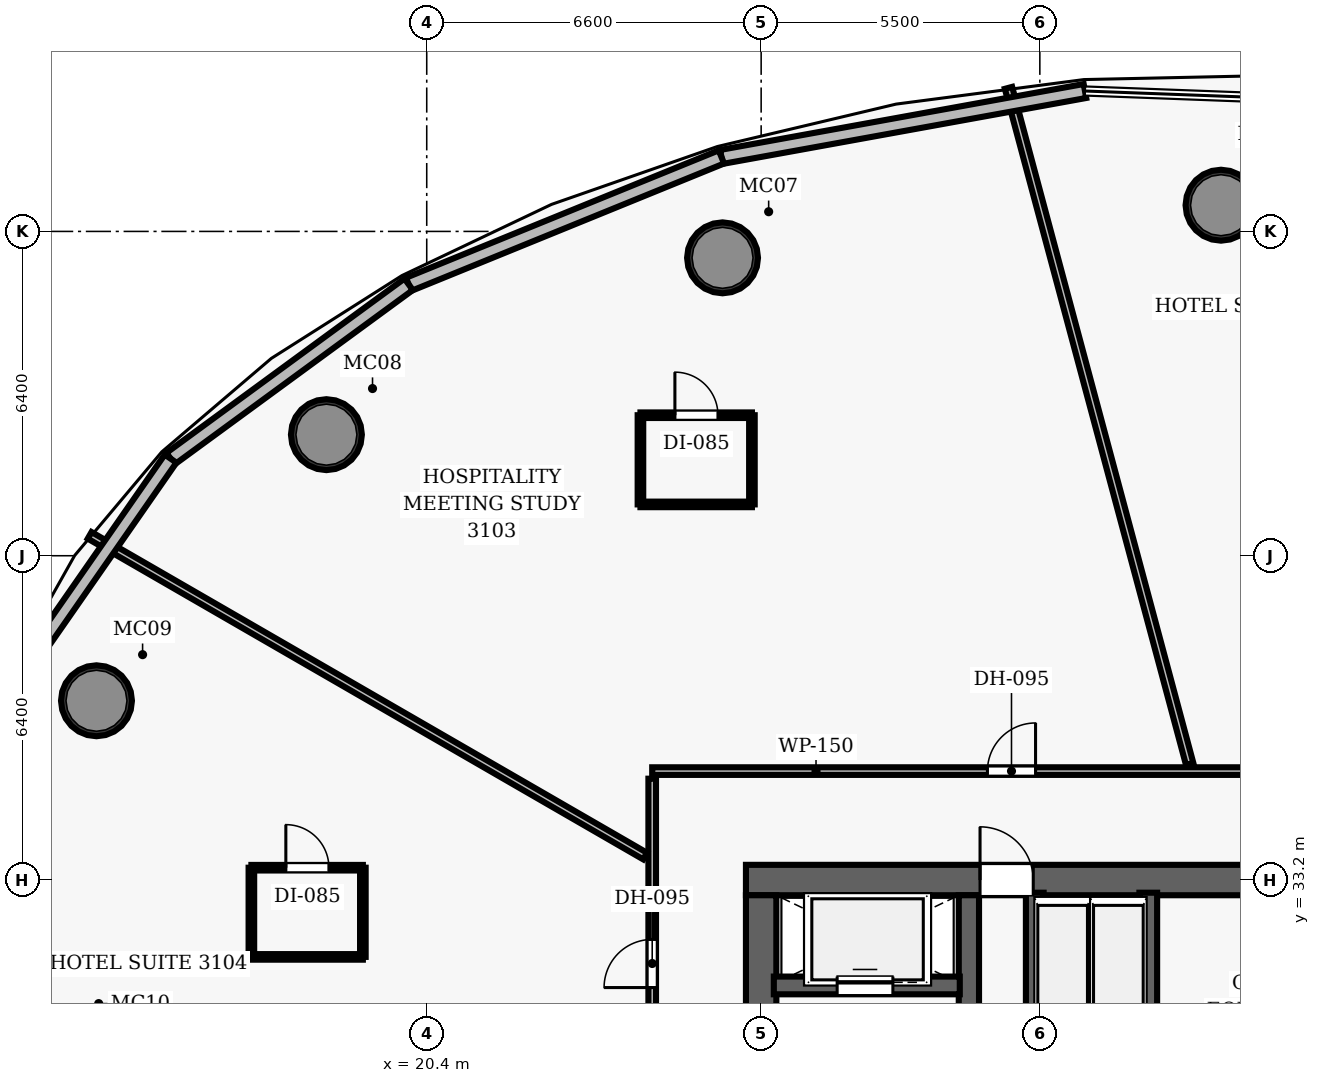
"""IFC4 building model, lengths in metres.
Left out: names, types, materials, properties, quantities, classifications, styles, units other than length and angle.
Written with IfcOpenShell. Run it as: python <this file> out.ifc"""

import sys

from ifc_helpers import new_model, si_unit, direction, frame, frame_2d, origin, origin_2d, place, context, subcontext, project, spatial, rectangle, hollow_circle, extrude, element, fill, save


model = new_model("IFC4")
c1 = context("Model", 3, precision=1e-05, world=origin(), true_north=direction((0.0, 1.0)))
c2 = subcontext(c1, "Body", "Model", "MODEL_VIEW")
j1 = project(units=[si_unit("LENGTHUNIT", "METRE"), si_unit("PLANEANGLEUNIT", "RADIAN")], contexts=[c1])
p1 = place(None, origin())
s1 = spatial("IfcSite", under=j1, at=p1, CompositionType="ELEMENT")
p2 = place(p1, origin())
s2 = spatial("IfcBuilding", under=s1, at=p2, CompositionType="ELEMENT")
p3 = place(p2, frame((0.0, 0.0, 127.3)))
s3 = spatial("IfcBuildingStorey", under=s2, at=p3, CompositionType="ELEMENT", Elevation=127.3)
p4 = place(p3, frame((26.7, 33.2, 0.0), z_axis=(0.0, 0.0, 1.0), x_axis=(1.0, 0.0, 0.0)))
e1 = element("IfcWall", 1, at=p4, inside=s3, PredefinedType="SHEAR", context=c2, shape_type="SweptSolid", body=[
    extrude(rectangle(XDim=22.6, YDim=0.6, at=frame_2d((11.3, 0.0))), origin(), (0.0, 0.0, 1.0), 3.5),
])
p5 = place(p4, frame((4.62, 0.0, 0.0)))
e2 = element("IfcOpeningElement", 2, at=p5, cuts=e1, PredefinedType="OPENING", context=c2, shape_type="SweptSolid", body=[
    extrude(rectangle(XDim=1.05, YDim=2.15, at=frame_2d((0.525, 1.075))), frame((0.0, 0.31, 0.0), z_axis=(0.0, -1.0, 0.0), x_axis=(1.0, 0.0, 0.0)), (0.0, 0.0, 1.0), 0.62),
])
p6 = place(p4, frame((14.52, 0.0, 0.0)))
e3 = element("IfcOpeningElement", 3, at=p6, cuts=e1, PredefinedType="OPENING", context=c2, shape_type="SweptSolid", body=[
    extrude(rectangle(XDim=1.05, YDim=2.15, at=frame_2d((0.525, 1.075))), frame((0.0, 0.31, 0.0), z_axis=(0.0, -1.0, 0.0), x_axis=(1.0, 0.0, 0.0)), (0.0, 0.0, 1.0), 0.62),
])
p7 = place(p3, frame((27.0, 19.1, 0.0), z_axis=(0.0, 0.0, 1.0), x_axis=(0.0, 1.0, 0.0)))
e4 = element("IfcWall", 4, at=p7, inside=s3, PredefinedType="SHEAR", context=c2, shape_type="SweptSolid", body=[
    extrude(rectangle(XDim=13.8, YDim=0.6, at=frame_2d((6.9, 0.0))), origin(), (0.0, 0.0, 1.0), 3.5),
])
p8 = place(p7, frame((8.2, 0.0, 0.0)))
e5 = element("IfcOpeningElement", 5, at=p8, cuts=e4, PredefinedType="OPENING", context=c2, shape_type="SweptSolid", body=[
    extrude(rectangle(XDim=1.05, YDim=2.15, at=frame_2d((0.525, 1.075))), frame((0.0, 0.31, 0.0), z_axis=(0.0, -1.0, 0.0), x_axis=(1.0, 0.0, 0.0)), (0.0, 0.0, 1.0), 0.62),
])
p9 = place(p3, frame((31.1, 19.1, 0.0), z_axis=(0.0, 0.0, 1.0), x_axis=(0.0, 1.0, 0.0)))
e6 = element("IfcWall", 6, at=p9, inside=s3, PredefinedType="SHEAR", context=c2, shape_type="SweptSolid", body=[
    extrude(rectangle(XDim=13.8, YDim=0.4, at=frame_2d((6.9, 0.0))), origin(), (0.0, 0.0, 1.0), 3.5),
])
for number, where, z_axis, x_axis in (
    (7, (36.076, 46.517, 0.0), (0.0, 0.0, 1.0), (1.0, 0.0, 0.0)),
    (8, (26.238, 45.479, 0.0), (0.0, 0.0, 1.0), (1.0, 0.0, 0.0)),
    (9, (18.42, 41.989, 0.0), (0.0, 0.0, 1.0), (1.0, 0.0, 0.0)),
    (10, (13.882, 36.738, 0.0), (0.0, 0.0, 1.0), (1.0, 0.0, 0.0)),
):
    element("IfcColumn", number, at=place(p3, frame(where, z_axis=z_axis, x_axis=x_axis)), inside=s3, PredefinedType="COLUMN", context=c2, shape_type="SweptSolid", body=[
        extrude(hollow_circle(Radius=0.7, WallThickness=0.055, at=origin_2d()), origin(), (0.0, 0.0, 1.0), 3.5),
    ])
p10 = place(p3, frame((27.25, 31.12, 0.0), z_axis=(0.0, 0.0, 1.0), x_axis=(1.0, 0.0, 0.0)))
e11 = element("IfcWall", 11, at=p10, inside=s3, PredefinedType="SHEAR", context=c2, shape_type="SweptSolid", body=[
    extrude(rectangle(XDim=3.67, YDim=0.35, at=frame_2d((1.835, 0.0))), origin(), (0.0, 0.0, 1.0), 2.675),
])
p11 = place(p10, frame((1.25, 0.0, 0.0)))
e12 = element("IfcOpeningElement", 12, at=p11, cuts=e11, PredefinedType="OPENING", context=c2, shape_type="SweptSolid", body=[
    extrude(rectangle(XDim=1.1, YDim=2.15, at=frame_2d((0.55, 1.075))), frame((0.0, 0.185, 0.0), z_axis=(0.0, -1.0, 0.0), x_axis=(1.0, 0.0, 0.0)), (0.0, 0.0, 1.0), 0.37),
])
p12 = place(p3, frame((34.64, 26.69, 0.0), z_axis=(0.0, 0.0, 1.0), x_axis=(0.0, 1.0, 0.0)))
e13 = element("IfcWall", 13, at=p12, inside=s3, PredefinedType="SHEAR", context=c2, shape_type="SweptSolid", body=[
    extrude(rectangle(XDim=6.26, YDim=0.35, at=frame_2d((3.13, 0.0))), origin(), (0.0, 0.0, 1.0), 3.5),
])
p13 = place(p3, frame((32.4, 30.22, 0.0), z_axis=(0.0, 0.0, 1.0), x_axis=(0.0, 1.0, 0.0)))
e14 = element("IfcWall", 14, at=p13, inside=s3, PredefinedType="SHEAR", context=c2, shape_type="SweptSolid", body=[
    extrude(rectangle(XDim=2.73, YDim=0.35, at=frame_2d((1.365, 0.0))), origin(), (0.0, 0.0, 1.0), 2.675),
])
p14 = place(p3, frame((24.85, 35.35, 0.0), z_axis=(0.0, 0.0, 1.0), x_axis=(1.0, 0.0, 0.0)))
e15 = element("IfcWall", 15, at=p14, inside=s3, PredefinedType="PARTITIONING", context=c2, shape_type="SweptSolid", body=[
    extrude(rectangle(XDim=26.0, YDim=0.15, at=frame_2d((13.0, 0.0))), origin(), (0.0, 0.0, 1.0), 2.675),
])
p15 = place(p14, frame((19.766, 0.0, 0.0)))
e16 = element("IfcOpeningElement", 16, at=p15, cuts=e15, PredefinedType="OPENING", context=c2, shape_type="SweptSolid", body=[
    extrude(rectangle(XDim=0.95, YDim=2.15, at=frame_2d((0.475, 1.075))), frame((0.0, 0.085, 0.0), z_axis=(0.0, -1.0, 0.0), x_axis=(1.0, 0.0, 0.0)), (0.0, 0.0, 1.0), 0.17),
])
p16 = place(p14, frame((12.852, 0.0, 0.0)))
e17 = element("IfcOpeningElement", 17, at=p16, cuts=e15, PredefinedType="OPENING", context=c2, shape_type="SweptSolid", body=[
    extrude(rectangle(XDim=0.95, YDim=2.15, at=frame_2d((0.475, 1.075))), frame((0.0, 0.085, 0.0), z_axis=(0.0, -1.0, 0.0), x_axis=(1.0, 0.0, 0.0)), (0.0, 0.0, 1.0), 0.17),
])
p17 = place(p14, frame((6.616, 0.0, 0.0)))
e18 = element("IfcOpeningElement", 18, at=p17, cuts=e15, PredefinedType="OPENING", context=c2, shape_type="SweptSolid", body=[
    extrude(rectangle(XDim=0.95, YDim=2.15, at=frame_2d((0.475, 1.075))), frame((0.0, 0.085, 0.0), z_axis=(0.0, -1.0, 0.0), x_axis=(1.0, 0.0, 0.0)), (0.0, 0.0, 1.0), 0.17),
])
p18 = place(p3, frame((24.85, 27.08, 0.0), z_axis=(0.0, 0.0, 1.0), x_axis=(0.0, 1.0, 0.0)))
e19 = element("IfcWall", 19, at=p18, inside=s3, PredefinedType="PARTITIONING", context=c2, shape_type="SweptSolid", body=[
    extrude(rectangle(XDim=8.12, YDim=0.15, at=frame_2d((4.06, 0.0))), origin(), (0.0, 0.0, 1.0), 2.675),
])
p19 = place(p18, frame((3.998, 0.0, 0.0)))
e20 = element("IfcOpeningElement", 20, at=p19, cuts=e19, PredefinedType="OPENING", context=c2, shape_type="SweptSolid", body=[
    extrude(rectangle(XDim=0.95, YDim=2.15, at=frame_2d((0.475, 1.075))), frame((0.0, 0.085, 0.0), z_axis=(0.0, -1.0, 0.0), x_axis=(1.0, 0.0, 0.0)), (0.0, 0.0, 1.0), 0.17),
])
p20 = place(p3, frame((35.457, 35.49, 0.0), z_axis=(0.0, 0.0, 1.0), x_axis=(-0.258827369618, 0.965923595704, 0.0)))
e21 = element("IfcWall", 21, at=p20, inside=s3, PredefinedType="PARTITIONING", context=c2, shape_type="SweptSolid", body=[
    extrude(rectangle(XDim=13.814, YDim=0.15, at=frame_2d((6.907, 0.0))), origin(), (0.0, 0.0, 1.0), 2.675),
])
p21 = place(p3, frame((24.71, 33.673, 0.0), z_axis=(0.0, 0.0, 1.0), x_axis=(-0.866026921982, 0.499997370395, 0.0)))
e22 = element("IfcWall", 22, at=p21, inside=s3, PredefinedType="PARTITIONING", context=c2, shape_type="SweptSolid", body=[
    extrude(rectangle(XDim=12.658, YDim=0.15, at=frame_2d((6.329, 0.0))), origin(), (0.0, 0.0, 1.0), 2.675),
])
p22 = place(p3, frame((24.618, 40.613, 0.0), z_axis=(0.0, 0.0, 1.0), x_axis=(1.0, 0.0, 0.0)))
e23 = element("IfcWall", 23, at=p22, inside=s3, PredefinedType="PARTITIONING", context=c2, shape_type="SweptSolid", body=[
    extrude(rectangle(XDim=2.2, YDim=0.11, at=frame_2d((1.1, 0.0))), origin(), (0.0, 0.0, 1.0), 2.675),
])
p23 = place(p3, frame((24.618, 42.373, 0.0), z_axis=(0.0, 0.0, 1.0), x_axis=(1.0, 0.0, 0.0)))
e24 = element("IfcWall", 24, at=p23, inside=s3, PredefinedType="PARTITIONING", context=c2, shape_type="SweptSolid", body=[
    extrude(rectangle(XDim=2.2, YDim=0.11, at=frame_2d((1.1, 0.0))), origin(), (0.0, 0.0, 1.0), 2.675),
])
p24 = place(p23, frame((0.68, 0.0, 0.0)))
e25 = element("IfcOpeningElement", 25, at=p24, cuts=e24, PredefinedType="OPENING", context=c2, shape_type="SweptSolid", body=[
    extrude(rectangle(XDim=0.85, YDim=2.1, at=frame_2d((0.425, 1.05))), frame((0.0, 0.065, 0.0), z_axis=(0.0, -1.0, 0.0), x_axis=(1.0, 0.0, 0.0)), (0.0, 0.0, 1.0), 0.13),
])
for number, where, z_axis, x_axis in (
    (26, (24.618, 40.613, 0.0), (0.0, 0.0, 1.0), (0.0, 1.0, 0.0)),
    (27, (26.818, 40.613, 0.0), (0.0, 0.0, 1.0), (0.0, 1.0, 0.0)),
):
    element("IfcWall", number, at=place(p3, frame(where, z_axis=z_axis, x_axis=x_axis)), inside=s3, PredefinedType="PARTITIONING", context=c2, shape_type="SweptSolid", body=[
        extrude(rectangle(XDim=1.76, YDim=0.11, at=frame_2d((0.88, 0.0))), origin(), (0.0, 0.0, 1.0), 2.675),
    ])
p25 = place(p3, frame((16.94, 31.683, 0.0), z_axis=(0.0, 0.0, 1.0), x_axis=(1.0, 0.0, 0.0)))
e28 = element("IfcWall", 28, at=p25, inside=s3, PredefinedType="PARTITIONING", context=c2, shape_type="SweptSolid", body=[
    extrude(rectangle(XDim=2.2, YDim=0.11, at=frame_2d((1.1, 0.0))), origin(), (0.0, 0.0, 1.0), 2.675),
])
p26 = place(p3, frame((16.94, 33.443, 0.0), z_axis=(0.0, 0.0, 1.0), x_axis=(1.0, 0.0, 0.0)))
e29 = element("IfcWall", 29, at=p26, inside=s3, PredefinedType="PARTITIONING", context=c2, shape_type="SweptSolid", body=[
    extrude(rectangle(XDim=2.2, YDim=0.11, at=frame_2d((1.1, 0.0))), origin(), (0.0, 0.0, 1.0), 2.675),
])
p27 = place(p26, frame((0.68, 0.0, 0.0)))
e30 = element("IfcOpeningElement", 30, at=p27, cuts=e29, PredefinedType="OPENING", context=c2, shape_type="SweptSolid", body=[
    extrude(rectangle(XDim=0.85, YDim=2.1, at=frame_2d((0.425, 1.05))), frame((0.0, 0.065, 0.0), z_axis=(0.0, -1.0, 0.0), x_axis=(1.0, 0.0, 0.0)), (0.0, 0.0, 1.0), 0.13),
])
for number, where, z_axis, x_axis in (
    (31, (16.94, 31.683, 0.0), (0.0, 0.0, 1.0), (0.0, 1.0, 0.0)),
    (32, (19.14, 31.683, 0.0), (0.0, 0.0, 1.0), (0.0, 1.0, 0.0)),
):
    element("IfcWall", number, at=place(p3, frame(where, z_axis=z_axis, x_axis=x_axis)), inside=s3, PredefinedType="PARTITIONING", context=c2, shape_type="SweptSolid", body=[
        extrude(rectangle(XDim=1.76, YDim=0.11, at=frame_2d((0.88, 0.0))), origin(), (0.0, 0.0, 1.0), 2.675),
    ])
p28 = place(p3, frame((26.216, 47.47, 0.0), z_axis=(0.0, 0.0, 1.0), x_axis=(0.983958718809, 0.178396299514, 0.0)))
e33 = element("IfcWall", 33, at=p28, inside=s3, PredefinedType="SOLIDWALL", context=c2, shape_type="SweptSolid", body=[
    extrude(rectangle(XDim=7.292, YDim=0.28, at=frame_2d((3.646, 0.0))), origin(), (0.0, 0.0, 1.0), 3.26),
])
p29 = place(p3, frame((20.043, 44.956, 0.0), z_axis=(0.0, 0.0, 1.0), x_axis=(0.926116532719, 0.37723754827, 0.0)))
e34 = element("IfcWall", 34, at=p29, inside=s3, PredefinedType="SOLIDWALL", context=c2, shape_type="SweptSolid", body=[
    extrude(rectangle(XDim=6.665, YDim=0.28, at=frame_2d((3.333, 0.0))), origin(), (0.0, 0.0, 1.0), 3.26),
])
p30 = place(p3, frame((15.345, 41.516, 0.0), z_axis=(0.0, 0.0, 1.0), x_axis=(0.80688994243, 0.590701803625, 0.0)))
e35 = element("IfcWall", 35, at=p30, inside=s3, PredefinedType="SOLIDWALL", context=c2, shape_type="SweptSolid", body=[
    extrude(rectangle(XDim=5.823, YDim=0.28, at=frame_2d((2.911, 0.0))), origin(), (0.0, 0.0, 1.0), 3.26),
])
p31 = place(p3, frame((12.39, 37.269, 0.0), z_axis=(0.0, 0.0, 1.0), x_axis=(0.571097665785, 0.820882120731, 0.0)))
e36 = element("IfcWall", 36, at=p31, inside=s3, PredefinedType="SOLIDWALL", context=c2, shape_type="SweptSolid", body=[
    extrude(rectangle(XDim=5.174, YDim=0.28, at=frame_2d((2.587, 0.0))), origin(), (0.0, 0.0, 1.0), 3.26),
])
p32 = place(p5, origin())
e37 = element("IfcDoor", 37, at=p32, inside=s3, OperationType="SINGLE_SWING_LEFT", PredefinedType="DOOR", context=c2, shape_type="SweptSolid", body=[
    extrude(rectangle(XDim=1.05, YDim=2.15, at=frame_2d((0.525, 1.075))), frame((0.0, 0.025, 0.0), z_axis=(0.0, -1.0, 0.0), x_axis=(1.0, 0.0, 0.0)), (0.0, 0.0, 1.0), 0.05),
])
fill(e2, e37)
p33 = place(p17, origin())
e38 = element("IfcDoor", 38, at=p33, inside=s3, OperationType="SINGLE_SWING_RIGHT", PredefinedType="DOOR", context=c2, shape_type="SweptSolid", body=[
    extrude(rectangle(XDim=0.95, YDim=2.15, at=frame_2d((0.475, 1.075))), frame((0.0, 0.025, 0.0), z_axis=(0.0, -1.0, 0.0), x_axis=(1.0, 0.0, 0.0)), (0.0, 0.0, 1.0), 0.05),
])
fill(e18, e38)
p34 = place(p24, origin())
e39 = element("IfcDoor", 39, at=p34, inside=s3, OperationType="SINGLE_SWING_LEFT", PredefinedType="DOOR", context=c2, shape_type="SweptSolid", body=[
    extrude(rectangle(XDim=0.85, YDim=2.1, at=frame_2d((0.425, 1.05))), frame((0.0, 0.025, 0.0), z_axis=(0.0, -1.0, 0.0), x_axis=(1.0, 0.0, 0.0)), (0.0, 0.0, 1.0), 0.05),
])
fill(e25, e39)
p35 = place(p19, origin())
e40 = element("IfcDoor", 40, at=p35, inside=s3, OperationType="SINGLE_SWING_LEFT", PredefinedType="DOOR", context=c2, shape_type="SweptSolid", body=[
    extrude(rectangle(XDim=0.95, YDim=2.15, at=frame_2d((0.475, 1.075))), frame((0.0, 0.025, 0.0), z_axis=(0.0, -1.0, 0.0), x_axis=(1.0, 0.0, 0.0)), (0.0, 0.0, 1.0), 0.05),
])
fill(e20, e40)
p36 = place(p27, origin())
e41 = element("IfcDoor", 41, at=p36, inside=s3, OperationType="SINGLE_SWING_LEFT", PredefinedType="DOOR", context=c2, shape_type="SweptSolid", body=[
    extrude(rectangle(XDim=0.85, YDim=2.1, at=frame_2d((0.425, 1.05))), frame((0.0, 0.025, 0.0), z_axis=(0.0, -1.0, 0.0), x_axis=(1.0, 0.0, 0.0)), (0.0, 0.0, 1.0), 0.05),
])
fill(e30, e41)
p37 = place(p11, origin())
e42 = element("IfcDoor", 42, at=p37, inside=s3, OperationType="SLIDING_TO_LEFT", PredefinedType="DOOR", context=c2, shape_type="SweptSolid", body=[
    extrude(rectangle(XDim=1.1, YDim=2.15, at=frame_2d((0.55, 1.075))), frame((0.0, 0.025, 0.0), z_axis=(0.0, -1.0, 0.0), x_axis=(1.0, 0.0, 0.0)), (0.0, 0.0, 1.0), 0.05),
])
fill(e12, e42)
save(model, sys.argv[1])
